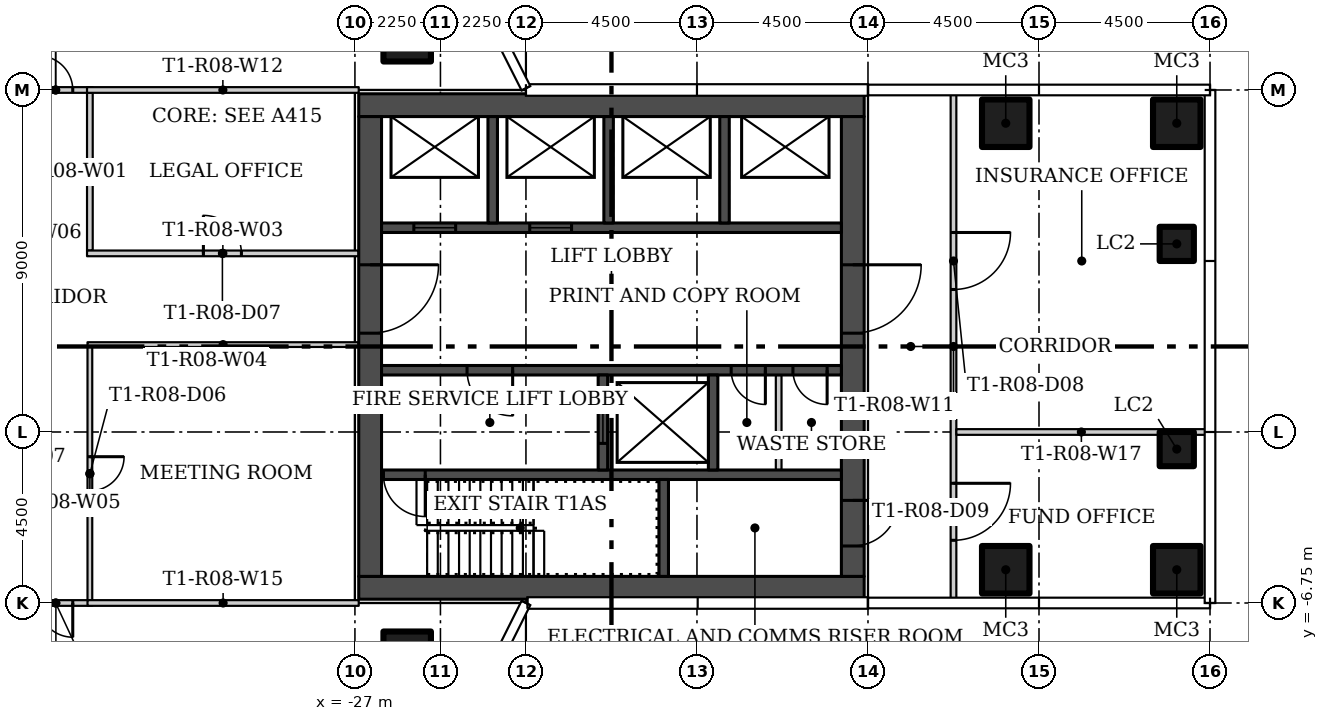
"""IFC4 building model, lengths in metres.
Left out: names, types, materials, properties, quantities, classifications, styles, units other than length and angle.
Written with IfcOpenShell. Run it as: python <this file> out.ifc"""

import sys

from ifc_helpers import new_model, si_unit, direction, frame, frame_2d, origin, origin_2d, place, context, subcontext, project, spatial, rectangle, hollow_rectangle, extrude, element, fill, save


model = new_model("IFC4")
c1 = context("Model", 3, precision=1e-05, world=origin(), true_north=direction((0.0, 1.0)))
c2 = subcontext(c1, "Body", "Model", "MODEL_VIEW")
j1 = project(units=[si_unit("LENGTHUNIT", "METRE"), si_unit("PLANEANGLEUNIT", "RADIAN")], contexts=[c1])
p1 = place(None, origin())
s1 = spatial("IfcSite", under=j1, at=p1, CompositionType="ELEMENT")
p2 = place(p1, origin())
s2 = spatial("IfcBuilding", under=s1, at=p2, CompositionType="ELEMENT")
p3 = place(p2, frame((0.0, 0.0, 81.9)))
s3 = spatial("IfcBuildingStorey", under=s2, at=p3, CompositionType="ELEMENT", Elevation=81.9)
for number, where in (
    (1, (-25.625, 8.125, 0.0)),
    (2, (-25.625, -8.125, 0.0)),
    (3, (-9.875, -5.875, 0.0)),
    (4, (-5.375, -5.875, 0.0)),
    (5, (-9.875, 5.875, 0.0)),
    (6, (-5.375, 5.875, 0.0)),
):
    element("IfcColumn", number, at=place(p3, frame(where)), inside=s3, PredefinedType="COLUMN", context=c2, shape_type="SweptSolid", body=[
        extrude(hollow_rectangle(XDim=1.25, YDim=1.25, WallThickness=0.05, at=origin_2d()), origin(), (0.0, 0.0, 1.0), 3.55),
    ])
for number, where in (
    (7, (-5.375, -2.7, 0.0)),
    (8, (-5.375, 2.7, 0.0)),
):
    element("IfcColumn", number, at=place(p3, frame(where)), inside=s3, PredefinedType="COLUMN", context=c2, shape_type="SweptSolid", body=[
        extrude(hollow_rectangle(XDim=0.9, YDim=0.9, WallThickness=0.036, at=origin_2d()), origin(), (0.0, 0.0, 1.0), 3.55),
    ])
p4 = place(p3, frame((-33.975, 6.675, 0.0), z_axis=(0.0, 0.0, 1.0), x_axis=(0.0, -1.0, 0.0)))
e9 = element("IfcWall", 9, at=p4, inside=s3, PredefinedType="PARTITIONING", context=c2, shape_type="SweptSolid", body=[
    extrude(rectangle(XDim=4.15, YDim=0.15, at=frame_2d((2.075, 0.0))), origin(), (0.0, 0.0, 1.0), 3.55),
])
p5 = place(p3, frame((-34.05, 2.45, 0.0)))
e10 = element("IfcWall", 10, at=p5, inside=s3, PredefinedType="PARTITIONING", context=c2, shape_type="SweptSolid", body=[
    extrude(rectangle(XDim=7.15, YDim=0.15, at=frame_2d((3.575, 0.0))), origin(), (0.0, 0.0, 1.0), 3.55),
])
p6 = place(p5, frame((3.062, 0.0, 0.0)))
e11 = element("IfcOpeningElement", 11, at=p6, cuts=e10, PredefinedType="OPENING", context=c2, shape_type="SweptSolid", body=[
    extrude(rectangle(XDim=1.0, YDim=2.4, at=frame_2d((0.5, 1.2))), frame((0.0, 0.085, 0.0), z_axis=(0.0, -1.0, 0.0), x_axis=(1.0, 0.0, 0.0)), (0.0, 0.0, 1.0), 0.17),
])
p7 = place(p3, frame((-26.9, 0.05, 0.0), z_axis=(0.0, 0.0, 1.0), x_axis=(-1.0, 0.0, 0.0)))
e12 = element("IfcWall", 12, at=p7, inside=s3, PredefinedType="PARTITIONING", context=c2, shape_type="SweptSolid", body=[
    extrude(rectangle(XDim=7.137, YDim=0.125, at=frame_2d((3.569, 0.0))), origin(), (0.0, 0.0, 1.0), 3.55),
])
p8 = place(p3, frame((-33.975, -0.013, 0.0), z_axis=(0.0, 0.0, 1.0), x_axis=(0.0, -1.0, 0.0)))
e13 = element("IfcWall", 13, at=p8, inside=s3, PredefinedType="PARTITIONING", context=c2, shape_type="SweptSolid", body=[
    extrude(rectangle(XDim=6.662, YDim=0.125, at=frame_2d((3.331, 0.0))), origin(), (0.0, 0.0, 1.0), 3.55),
])
p9 = place(p8, frame((2.887, 0.0, 0.0)))
e14 = element("IfcOpeningElement", 14, at=p9, cuts=e13, PredefinedType="OPENING", context=c2, shape_type="SweptSolid", body=[
    extrude(rectangle(XDim=0.9, YDim=2.1, at=frame_2d((0.45, 1.05))), frame((0.0, 0.073, 0.0), z_axis=(0.0, -1.0, 0.0), x_axis=(1.0, 0.0, 0.0)), (0.0, 0.0, 1.0), 0.145),
])
p10 = place(p3, frame((-35.85, 6.75, 0.0)))
e15 = element("IfcWall", 15, at=p10, inside=s3, PredefinedType="PARTITIONING", context=c2, shape_type="SweptSolid", body=[
    extrude(rectangle(XDim=1.951, YDim=0.15, at=frame_2d((0.975, 0.0))), origin(), (0.0, 0.0, 1.0), 3.55),
])
p11 = place(p10, frame((0.525, 0.0, 0.0)))
e16 = element("IfcOpeningElement", 16, at=p11, cuts=e15, PredefinedType="OPENING", context=c2, shape_type="SweptSolid", body=[
    extrude(rectangle(XDim=0.9, YDim=2.1, at=frame_2d((0.45, 1.05))), frame((0.0, 0.085, 0.0), z_axis=(0.0, -1.0, 0.0), x_axis=(1.0, 0.0, 0.0)), (0.0, 0.0, 1.0), 0.17),
])
p12 = place(p3, frame((-33.912, -6.75, 0.0), z_axis=(0.0, 0.0, 1.0), x_axis=(-1.0, 0.0, 0.0)))
e17 = element("IfcWall", 17, at=p12, inside=s3, PredefinedType="PARTITIONING", context=c2, shape_type="SweptSolid", body=[
    extrude(rectangle(XDim=1.913, YDim=0.15, at=frame_2d((0.957, 0.0))), origin(), (0.0, 0.0, 1.0), 3.55),
])
p13 = place(p12, frame((0.513, 0.0, 0.0)))
e18 = element("IfcOpeningElement", 18, at=p13, cuts=e17, PredefinedType="OPENING", context=c2, shape_type="SweptSolid", body=[
    extrude(rectangle(XDim=0.9, YDim=2.1, at=frame_2d((0.45, 1.05))), frame((0.0, 0.085, 0.0), z_axis=(0.0, -1.0, 0.0), x_axis=(1.0, 0.0, 0.0)), (0.0, 0.0, 1.0), 0.17),
])
p14 = place(p3, frame((-11.25, 6.655, 0.0), z_axis=(0.0, 0.0, 1.0), x_axis=(0.0, -1.0, 0.0)))
e19 = element("IfcWall", 19, at=p14, inside=s3, PredefinedType="PARTITIONING", context=c2, shape_type="SweptSolid", body=[
    extrude(rectangle(XDim=13.31, YDim=0.15, at=frame_2d((6.655, 0.0))), origin(), (0.0, 0.0, 1.0), 3.55),
])
p15 = place(p14, frame((3.655, 0.0, 0.0)))
e20 = element("IfcOpeningElement", 20, at=p15, cuts=e19, PredefinedType="OPENING", context=c2, shape_type="SweptSolid", body=[
    extrude(rectangle(XDim=1.5, YDim=2.1, at=frame_2d((0.75, 1.05))), frame((0.0, 0.085, 0.0), z_axis=(0.0, -1.0, 0.0), x_axis=(1.0, 0.0, 0.0)), (0.0, 0.0, 1.0), 0.17),
])
p16 = place(p14, frame((10.255, 0.0, 0.0)))
e21 = element("IfcOpeningElement", 21, at=p16, cuts=e19, PredefinedType="OPENING", context=c2, shape_type="SweptSolid", body=[
    extrude(rectangle(XDim=1.5, YDim=2.1, at=frame_2d((0.75, 1.05))), frame((0.0, 0.085, 0.0), z_axis=(0.0, -1.0, 0.0), x_axis=(1.0, 0.0, 0.0)), (0.0, 0.0, 1.0), 0.17),
])
p17 = place(p3, frame((-26.9, 6.75, 0.0), z_axis=(0.0, 0.0, 1.0), x_axis=(-1.0, 0.0, 0.0)))
e22 = element("IfcWall", 22, at=p17, inside=s3, PredefinedType="PARTITIONING", context=c2, shape_type="SweptSolid", body=[
    extrude(rectangle(XDim=7.15, YDim=0.15, at=frame_2d((3.575, 0.0))), origin(), (0.0, 0.0, 1.0), 3.55),
])
p18 = place(p3, frame((-34.037, -6.75, 0.0)))
e23 = element("IfcWall", 23, at=p18, inside=s3, PredefinedType="PARTITIONING", context=c2, shape_type="SweptSolid", body=[
    extrude(rectangle(XDim=7.137, YDim=0.15, at=frame_2d((3.569, 0.0))), origin(), (0.0, 0.0, 1.0), 3.55),
])
p19 = place(p3, frame((-4.595, -2.25, 0.0), z_axis=(0.0, 0.0, 1.0), x_axis=(-1.0, 0.0, 0.0)))
e24 = element("IfcWall", 24, at=p19, inside=s3, PredefinedType="PARTITIONING", context=c2, shape_type="SweptSolid", body=[
    extrude(rectangle(XDim=6.58, YDim=0.15, at=frame_2d((3.29, 0.0))), origin(), (0.0, 0.0, 1.0), 3.55),
])
for number, where in (
    (25, (-26.9, -6.35, 0.0)),
    (26, (-26.9, 6.35, 0.0)),
):
    element("IfcWall", number, at=place(p3, frame(where)), inside=s3, PredefinedType="SHEAR", context=c2, shape_type="SweptSolid", body=[
        extrude(rectangle(XDim=13.3, YDim=0.6, at=frame_2d((6.65, 0.0))), origin(), (0.0, 0.0, 1.0), 3.55),
    ])
p20 = place(p3, frame((-26.6, 6.05, 0.0), z_axis=(0.0, 0.0, 1.0), x_axis=(0.0, -1.0, 0.0)))
e27 = element("IfcWall", 27, at=p20, inside=s3, PredefinedType="SHEAR", context=c2, shape_type="SweptSolid", body=[
    extrude(rectangle(XDim=12.1, YDim=0.6, at=frame_2d((6.05, 0.0))), origin(), (0.0, 0.0, 1.0), 3.55),
])
p21 = place(p20, frame((3.9, 0.0, 0.0)))
e28 = element("IfcOpeningElement", 28, at=p21, cuts=e27, PredefinedType="OPENING", context=c2, shape_type="SweptSolid", body=[
    extrude(rectangle(XDim=1.8, YDim=2.4, at=frame_2d((0.9, 1.2))), frame((0.0, 0.31, 0.0), z_axis=(0.0, -1.0, 0.0), x_axis=(1.0, 0.0, 0.0)), (0.0, 0.0, 1.0), 0.62),
])
p22 = place(p3, frame((-13.9, 6.05, 0.0), z_axis=(0.0, 0.0, 1.0), x_axis=(0.0, -1.0, 0.0)))
e29 = element("IfcWall", 29, at=p22, inside=s3, PredefinedType="SHEAR", context=c2, shape_type="SweptSolid", body=[
    extrude(rectangle(XDim=12.1, YDim=0.6, at=frame_2d((6.05, 0.0))), origin(), (0.0, 0.0, 1.0), 3.55),
])
p23 = place(p22, frame((10.1, 0.0, 0.0)))
e30 = element("IfcOpeningElement", 30, at=p23, cuts=e29, PredefinedType="OPENING", context=c2, shape_type="SweptSolid", body=[
    extrude(rectangle(XDim=1.2, YDim=2.1, at=frame_2d((0.6, 1.05))), frame((0.0, 0.31, 0.0), z_axis=(0.0, -1.0, 0.0), x_axis=(1.0, 0.0, 0.0)), (0.0, 0.0, 1.0), 0.62),
])
p24 = place(p22, frame((3.9, 0.0, 0.0)))
e31 = element("IfcOpeningElement", 31, at=p24, cuts=e29, PredefinedType="OPENING", context=c2, shape_type="SweptSolid", body=[
    extrude(rectangle(XDim=1.8, YDim=2.4, at=frame_2d((0.9, 1.2))), frame((0.0, 0.31, 0.0), z_axis=(0.0, -1.0, 0.0), x_axis=(1.0, 0.0, 0.0)), (0.0, 0.0, 1.0), 0.62),
])
p25 = place(p3, frame((-14.2, -3.375, 0.0), z_axis=(0.0, 0.0, 1.0), x_axis=(-1.0, 0.0, 0.0)))
e32 = element("IfcWall", 32, at=p25, inside=s3, PredefinedType="SHEAR", context=c2, shape_type="SweptSolid", body=[
    extrude(rectangle(XDim=12.1, YDim=0.25, at=frame_2d((6.05, 0.0))), origin(), (0.0, 0.0, 1.0), 3.55),
])
p26 = place(p25, frame((10.95, 0.0, 0.0)))
e33 = element("IfcOpeningElement", 33, at=p26, cuts=e32, PredefinedType="OPENING", context=c2, shape_type="SweptSolid", body=[
    extrude(rectangle(XDim=1.1, YDim=2.1, at=frame_2d((0.55, 1.05))), frame((0.0, 0.135, 0.0), z_axis=(0.0, -1.0, 0.0), x_axis=(1.0, 0.0, 0.0)), (0.0, 0.0, 1.0), 0.27),
])
p27 = place(p3, frame((-18.875, -6.05, 0.0), z_axis=(0.0, 0.0, 1.0), x_axis=(0.0, 1.0, 0.0)))
e34 = element("IfcWall", 34, at=p27, inside=s3, PredefinedType="SHEAR", context=c2, shape_type="SweptSolid", body=[
    extrude(rectangle(XDim=2.55, YDim=0.25, at=frame_2d((1.275, 0.0))), origin(), (0.0, 0.0, 1.0), 3.55),
])
p28 = place(p3, frame((-14.2, -0.625, 0.0), z_axis=(0.0, 0.0, 1.0), x_axis=(-1.0, 0.0, 0.0)))
e35 = element("IfcWall", 35, at=p28, inside=s3, PredefinedType="SHEAR", context=c2, shape_type="SweptSolid", body=[
    extrude(rectangle(XDim=12.1, YDim=0.25, at=frame_2d((6.05, 0.0))), origin(), (0.0, 0.0, 1.0), 3.55),
])
p29 = place(p28, frame((8.65, 0.0, 0.0)))
e36 = element("IfcOpeningElement", 36, at=p29, cuts=e35, PredefinedType="OPENING", context=c2, shape_type="SweptSolid", body=[
    extrude(rectangle(XDim=1.2, YDim=2.1, at=frame_2d((0.6, 1.05))), frame((0.0, 0.135, 0.0), z_axis=(0.0, -1.0, 0.0), x_axis=(1.0, 0.0, 0.0)), (0.0, 0.0, 1.0), 0.27),
])
p30 = place(p28, frame((2.0, 0.0, 0.0)))
e37 = element("IfcOpeningElement", 37, at=p30, cuts=e35, PredefinedType="OPENING", context=c2, shape_type="SweptSolid", body=[
    extrude(rectangle(XDim=0.9, YDim=2.1, at=frame_2d((0.45, 1.05))), frame((0.0, 0.135, 0.0), z_axis=(0.0, -1.0, 0.0), x_axis=(1.0, 0.0, 0.0)), (0.0, 0.0, 1.0), 0.27),
])
p31 = place(p28, frame((0.375, 0.0, 0.0)))
e38 = element("IfcOpeningElement", 38, at=p31, cuts=e35, PredefinedType="OPENING", context=c2, shape_type="SweptSolid", body=[
    extrude(rectangle(XDim=0.9, YDim=2.1, at=frame_2d((0.45, 1.05))), frame((0.0, 0.135, 0.0), z_axis=(0.0, -1.0, 0.0), x_axis=(1.0, 0.0, 0.0)), (0.0, 0.0, 1.0), 0.27),
])
p32 = place(p3, frame((-20.475, -3.25, 0.0), z_axis=(0.0, 0.0, 1.0), x_axis=(0.0, 1.0, 0.0)))
e39 = element("IfcWall", 39, at=p32, inside=s3, PredefinedType="SHEAR", context=c2, shape_type="SweptSolid", body=[
    extrude(rectangle(XDim=2.5, YDim=0.25, at=frame_2d((1.25, 0.0))), origin(), (0.0, 0.0, 1.0), 3.55),
])
p33 = place(p32, frame((0.7, 0.0, 0.0)))
e40 = element("IfcOpeningElement", 40, at=p33, cuts=e39, PredefinedType="OPENING", context=c2, shape_type="SweptSolid", body=[
    extrude(rectangle(XDim=1.1, YDim=2.1, at=frame_2d((0.55, 1.05))), frame((0.0, 0.135, 0.0), z_axis=(0.0, -1.0, 0.0), x_axis=(1.0, 0.0, 0.0)), (0.0, 0.0, 1.0), 0.27),
])
p34 = place(p3, frame((-17.575, -3.25, 0.0), z_axis=(0.0, 0.0, 1.0), x_axis=(0.0, 1.0, 0.0)))
e41 = element("IfcWall", 41, at=p34, inside=s3, PredefinedType="SHEAR", context=c2, shape_type="SweptSolid", body=[
    extrude(rectangle(XDim=2.5, YDim=0.25, at=frame_2d((1.25, 0.0))), origin(), (0.0, 0.0, 1.0), 3.55),
])
p35 = place(p3, frame((-15.85, -3.25, 0.0), z_axis=(0.0, 0.0, 1.0), x_axis=(0.0, 1.0, 0.0)))
e42 = element("IfcWall", 42, at=p35, inside=s3, PredefinedType="PARTITIONING", context=c2, shape_type="SweptSolid", body=[
    extrude(rectangle(XDim=2.5, YDim=0.15, at=frame_2d((1.25, 0.0))), origin(), (0.0, 0.0, 1.0), 3.55),
])
p36 = place(p3, frame((-26.3, 3.125, 0.0)))
e43 = element("IfcWall", 43, at=p36, inside=s3, PredefinedType="SHEAR", context=c2, shape_type="SweptSolid", body=[
    extrude(rectangle(XDim=12.1, YDim=0.25, at=frame_2d((6.05, 0.0))), origin(), (0.0, 0.0, 1.0), 3.55),
])
p37 = place(p36, frame((0.85, 0.0, 0.0)))
e44 = element("IfcOpeningElement", 44, at=p37, cuts=e43, PredefinedType="OPENING", context=c2, shape_type="SweptSolid", body=[
    extrude(rectangle(XDim=1.1, YDim=2.1, at=frame_2d((0.55, 1.05))), frame((0.0, 0.135, 0.0), z_axis=(0.0, -1.0, 0.0), x_axis=(1.0, 0.0, 0.0)), (0.0, 0.0, 1.0), 0.27),
])
p38 = place(p36, frame((3.9, 0.0, 0.0)))
e45 = element("IfcOpeningElement", 45, at=p38, cuts=e43, PredefinedType="OPENING", context=c2, shape_type="SweptSolid", body=[
    extrude(rectangle(XDim=1.1, YDim=2.1, at=frame_2d((0.55, 1.05))), frame((0.0, 0.135, 0.0), z_axis=(0.0, -1.0, 0.0), x_axis=(1.0, 0.0, 0.0)), (0.0, 0.0, 1.0), 0.27),
])
for number, where, z_axis, x_axis in (
    (46, (-23.375, 3.25, 0.0), (0.0, 0.0, 1.0), (0.0, 1.0, 0.0)),
    (47, (-20.325, 3.25, 0.0), (0.0, 0.0, 1.0), (0.0, 1.0, 0.0)),
    (48, (-17.275, 3.25, 0.0), (0.0, 0.0, 1.0), (0.0, 1.0, 0.0)),
):
    element("IfcWall", number, at=place(p3, frame(where, z_axis=z_axis, x_axis=x_axis)), inside=s3, PredefinedType="SHEAR", context=c2, shape_type="SweptSolid", body=[
        extrude(rectangle(XDim=2.8, YDim=0.25, at=frame_2d((1.4, 0.0))), origin(), (0.0, 0.0, 1.0), 3.55),
    ])
p39 = place(p11, origin())
e49 = element("IfcDoor", 49, at=p39, inside=s3, OperationType="SINGLE_SWING_LEFT", PredefinedType="DOOR", context=c2, shape_type="SweptSolid", body=[
    extrude(rectangle(XDim=0.9, YDim=2.1, at=frame_2d((0.45, 1.05))), frame((0.0, 0.025, 0.0), z_axis=(0.0, -1.0, 0.0), x_axis=(1.0, 0.0, 0.0)), (0.0, 0.0, 1.0), 0.05),
])
fill(e16, e49)
p40 = place(p13, origin())
e50 = element("IfcDoor", 50, at=p40, inside=s3, OperationType="SINGLE_SWING_RIGHT", PredefinedType="DOOR", context=c2, shape_type="SweptSolid", body=[
    extrude(rectangle(XDim=0.9, YDim=2.1, at=frame_2d((0.45, 1.05))), frame((0.0, 0.025, 0.0), z_axis=(0.0, -1.0, 0.0), x_axis=(1.0, 0.0, 0.0)), (0.0, 0.0, 1.0), 0.05),
])
fill(e18, e50)
p41 = place(p9, origin())
e51 = element("IfcDoor", 51, at=p41, inside=s3, OperationType="SINGLE_SWING_RIGHT", PredefinedType="DOOR", context=c2, shape_type="SweptSolid", body=[
    extrude(rectangle(XDim=0.9, YDim=2.1, at=frame_2d((0.45, 1.05))), frame((0.0, 0.025, 0.0), z_axis=(0.0, -1.0, 0.0), x_axis=(1.0, 0.0, 0.0)), (0.0, 0.0, 1.0), 0.05),
])
fill(e14, e51)
p42 = place(p6, origin())
e52 = element("IfcDoor", 52, at=p42, inside=s3, OperationType="SINGLE_SWING_RIGHT", PredefinedType="DOOR", context=c2, shape_type="SweptSolid", body=[
    extrude(rectangle(XDim=1.0, YDim=2.4, at=frame_2d((0.5, 1.2))), frame((0.0, 0.025, 0.0), z_axis=(0.0, -1.0, 0.0), x_axis=(1.0, 0.0, 0.0)), (0.0, 0.0, 1.0), 0.05),
])
fill(e11, e52)
p43 = place(p15, origin())
e53 = element("IfcDoor", 53, at=p43, inside=s3, OperationType="DOUBLE_DOOR_SINGLE_SWING", PredefinedType="DOOR", context=c2, shape_type="SweptSolid", body=[
    extrude(rectangle(XDim=1.5, YDim=2.1, at=frame_2d((0.75, 1.05))), frame((0.0, 0.025, 0.0), z_axis=(0.0, -1.0, 0.0), x_axis=(1.0, 0.0, 0.0)), (0.0, 0.0, 1.0), 0.05),
])
fill(e20, e53)
p44 = place(p16, origin())
e54 = element("IfcDoor", 54, at=p44, inside=s3, OperationType="DOUBLE_DOOR_SINGLE_SWING", PredefinedType="DOOR", context=c2, shape_type="SweptSolid", body=[
    extrude(rectangle(XDim=1.5, YDim=2.1, at=frame_2d((0.75, 1.05))), frame((0.0, 0.025, 0.0), z_axis=(0.0, -1.0, 0.0), x_axis=(1.0, 0.0, 0.0)), (0.0, 0.0, 1.0), 0.05),
])
fill(e21, e54)
p45 = place(p21, origin())
e55 = element("IfcDoor", 55, at=p45, inside=s3, OperationType="DOUBLE_DOOR_SINGLE_SWING", PredefinedType="DOOR", context=c2, shape_type="SweptSolid", body=[
    extrude(rectangle(XDim=1.8, YDim=2.4, at=frame_2d((0.9, 1.2))), frame((0.0, 0.025, 0.0), z_axis=(0.0, -1.0, 0.0), x_axis=(1.0, 0.0, 0.0)), (0.0, 0.0, 1.0), 0.05),
])
fill(e28, e55)
p46 = place(p23, origin())
e56 = element("IfcDoor", 56, at=p46, inside=s3, OperationType="SINGLE_SWING_RIGHT", PredefinedType="DOOR", context=c2, shape_type="SweptSolid", body=[
    extrude(rectangle(XDim=1.2, YDim=2.1, at=frame_2d((0.6, 1.05))), frame((0.0, 0.025, 0.0), z_axis=(0.0, -1.0, 0.0), x_axis=(1.0, 0.0, 0.0)), (0.0, 0.0, 1.0), 0.05),
])
fill(e30, e56)
p47 = place(p24, origin())
e57 = element("IfcDoor", 57, at=p47, inside=s3, OperationType="DOUBLE_DOOR_SINGLE_SWING", PredefinedType="DOOR", context=c2, shape_type="SweptSolid", body=[
    extrude(rectangle(XDim=1.8, YDim=2.4, at=frame_2d((0.9, 1.2))), frame((0.0, 0.025, 0.0), z_axis=(0.0, -1.0, 0.0), x_axis=(1.0, 0.0, 0.0)), (0.0, 0.0, 1.0), 0.05),
])
fill(e31, e57)
p48 = place(p26, origin())
e58 = element("IfcDoor", 58, at=p48, inside=s3, OperationType="SINGLE_SWING_RIGHT", PredefinedType="DOOR", context=c2, shape_type="SweptSolid", body=[
    extrude(rectangle(XDim=1.1, YDim=2.1, at=frame_2d((0.55, 1.05))), frame((0.0, 0.025, 0.0), z_axis=(0.0, -1.0, 0.0), x_axis=(1.0, 0.0, 0.0)), (0.0, 0.0, 1.0), 0.05),
])
fill(e33, e58)
p49 = place(p29, origin())
e59 = element("IfcDoor", 59, at=p49, inside=s3, OperationType="SINGLE_SWING_RIGHT", PredefinedType="DOOR", context=c2, shape_type="SweptSolid", body=[
    extrude(rectangle(XDim=1.2, YDim=2.1, at=frame_2d((0.6, 1.05))), frame((0.0, 0.025, 0.0), z_axis=(0.0, -1.0, 0.0), x_axis=(1.0, 0.0, 0.0)), (0.0, 0.0, 1.0), 0.05),
])
fill(e36, e59)
p50 = place(p30, origin())
e60 = element("IfcDoor", 60, at=p50, inside=s3, OperationType="SINGLE_SWING_LEFT", PredefinedType="DOOR", context=c2, shape_type="SweptSolid", body=[
    extrude(rectangle(XDim=0.9, YDim=2.1, at=frame_2d((0.45, 1.05))), frame((0.0, 0.025, 0.0), z_axis=(0.0, -1.0, 0.0), x_axis=(1.0, 0.0, 0.0)), (0.0, 0.0, 1.0), 0.05),
])
fill(e37, e60)
p51 = place(p31, origin())
e61 = element("IfcDoor", 61, at=p51, inside=s3, OperationType="SINGLE_SWING_LEFT", PredefinedType="DOOR", context=c2, shape_type="SweptSolid", body=[
    extrude(rectangle(XDim=0.9, YDim=2.1, at=frame_2d((0.45, 1.05))), frame((0.0, 0.025, 0.0), z_axis=(0.0, -1.0, 0.0), x_axis=(1.0, 0.0, 0.0)), (0.0, 0.0, 1.0), 0.05),
])
fill(e38, e61)
p52 = place(p33, origin())
e62 = element("IfcDoor", 62, at=p52, inside=s3, OperationType="SLIDING_TO_LEFT", PredefinedType="DOOR", context=c2, shape_type="SweptSolid", body=[
    extrude(rectangle(XDim=1.1, YDim=2.1, at=frame_2d((0.55, 1.05))), frame((0.0, 0.025, 0.0), z_axis=(0.0, -1.0, 0.0), x_axis=(1.0, 0.0, 0.0)), (0.0, 0.0, 1.0), 0.05),
])
fill(e40, e62)
p53 = place(p37, origin())
e63 = element("IfcDoor", 63, at=p53, inside=s3, OperationType="SLIDING_TO_LEFT", PredefinedType="DOOR", context=c2, shape_type="SweptSolid", body=[
    extrude(rectangle(XDim=1.1, YDim=2.1, at=frame_2d((0.55, 1.05))), frame((0.0, 0.025, 0.0), z_axis=(0.0, -1.0, 0.0), x_axis=(1.0, 0.0, 0.0)), (0.0, 0.0, 1.0), 0.05),
])
fill(e44, e63)
p54 = place(p38, origin())
e64 = element("IfcDoor", 64, at=p54, inside=s3, OperationType="SLIDING_TO_LEFT", PredefinedType="DOOR", context=c2, shape_type="SweptSolid", body=[
    extrude(rectangle(XDim=1.1, YDim=2.1, at=frame_2d((0.55, 1.05))), frame((0.0, 0.025, 0.0), z_axis=(0.0, -1.0, 0.0), x_axis=(1.0, 0.0, 0.0)), (0.0, 0.0, 1.0), 0.05),
])
fill(e45, e64)
save(model, sys.argv[1])
